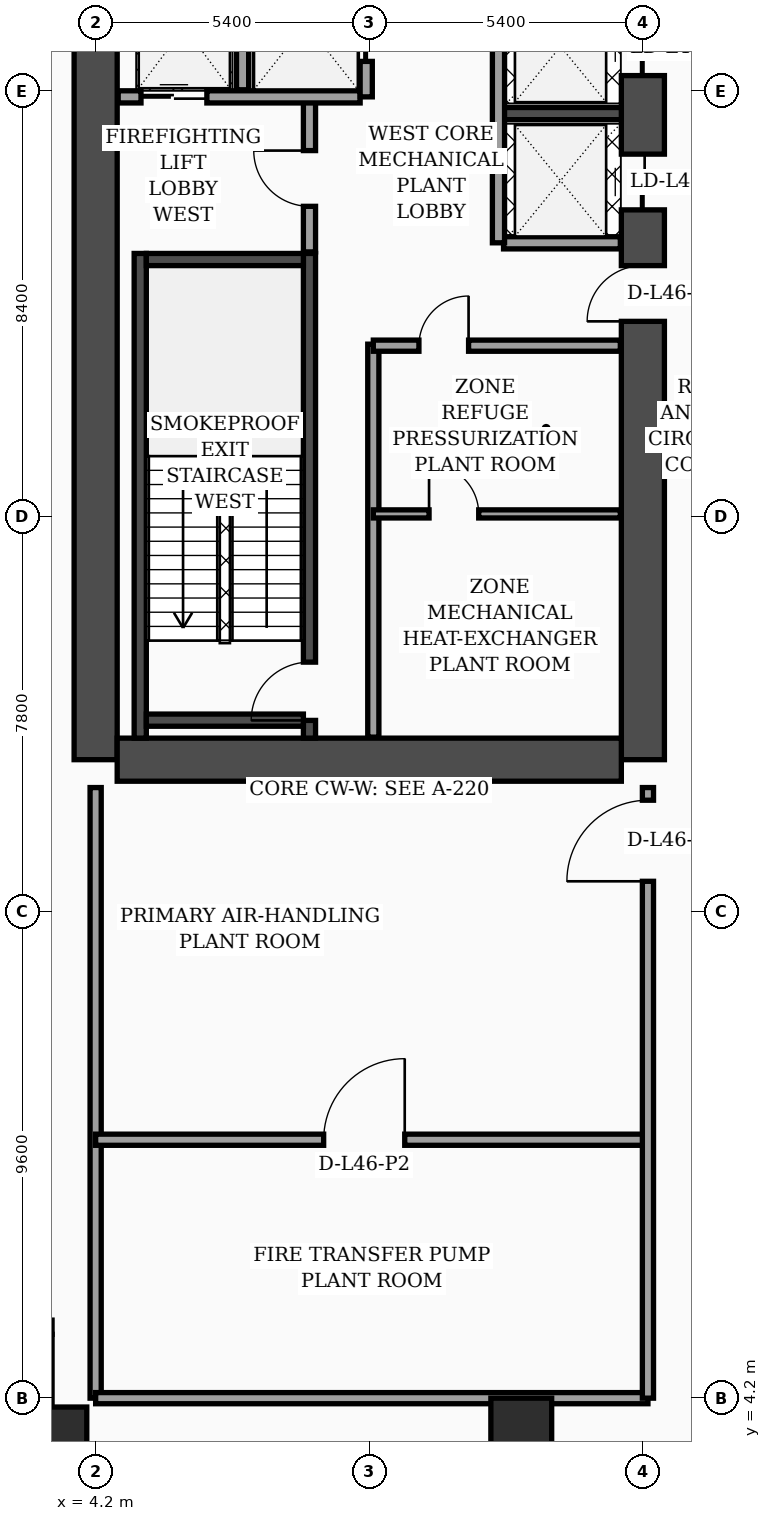
"""IFC4 building model, lengths in metres.
Left out: names, types, materials, properties, quantities, classifications, styles, units other than length and angle.
Written with IfcOpenShell. Run it as: python <this file> out.ifc"""

import sys

from ifc_helpers import new_model, si_unit, direction, frame, frame_2d, origin, origin_2d, place, context, subcontext, project, spatial, rectangle, hollow_rectangle, extrude, element, fill, save


model = new_model("IFC4")
c1 = context("Model", 3, precision=1e-05, world=origin(), true_north=direction((0.0, 1.0)))
c2 = subcontext(c1, "Body", "Model", "MODEL_VIEW")
j1 = project(units=[si_unit("LENGTHUNIT", "METRE"), si_unit("PLANEANGLEUNIT", "RADIAN")], contexts=[c1])
p1 = place(None, origin())
s1 = spatial("IfcSite", under=j1, at=p1, CompositionType="ELEMENT")
p2 = place(p1, origin())
s2 = spatial("IfcBuilding", under=s1, at=p2, CompositionType="ELEMENT")
p3 = place(p2, frame((0.0, 0.0, 186.5)))
s3 = spatial("IfcBuildingStorey", under=s2, at=p3, CompositionType="ELEMENT", Elevation=186.5)
p4 = place(p3, frame((4.2, 16.8, 0.0), z_axis=(0.0, 0.0, 1.0), x_axis=(0.0, 1.0, 0.0)))
e1 = element("IfcWall", 1, at=p4, inside=s3, PredefinedType="SHEAR", context=c2, shape_type="SweptSolid", body=[
    extrude(rectangle(XDim=21.6, YDim=0.85, at=frame_2d((10.8, 0.0))), origin(), (0.0, 0.0, 1.0), 4.35),
])
p5 = place(p3, frame((15.0, 16.8, 0.0), z_axis=(0.0, 0.0, 1.0), x_axis=(0.0, 1.0, 0.0)))
e2 = element("IfcWall", 2, at=p5, inside=s3, PredefinedType="SHEAR", context=c2, shape_type="SweptSolid", body=[
    extrude(rectangle(XDim=21.6, YDim=0.85, at=frame_2d((10.8, 0.0))), origin(), (0.0, 0.0, 1.0), 4.35),
])
p6 = place(p5, frame((8.65, 0.0, 0.0)))
e3 = element("IfcOpeningElement", 3, at=p6, cuts=e2, PredefinedType="OPENING", context=c2, shape_type="SweptSolid", body=[
    extrude(rectangle(XDim=1.1, YDim=2.2, at=frame_2d((0.55, 1.1))), frame((0.0, 0.435, 0.0), z_axis=(0.0, -1.0, 0.0), x_axis=(1.0, 0.0, 0.0)), (0.0, 0.0, 1.0), 0.87),
])
p7 = place(p5, frame((10.85, 0.0, 0.0)))
e4 = element("IfcOpeningElement", 4, at=p7, cuts=e2, PredefinedType="OPENING", context=c2, shape_type="SweptSolid", body=[
    extrude(rectangle(XDim=1.1, YDim=2.2, at=frame_2d((0.55, 1.1))), frame((0.0, 0.435, 0.0), z_axis=(0.0, -1.0, 0.0), x_axis=(1.0, 0.0, 0.0)), (0.0, 0.0, 1.0), 0.87),
])
p8 = place(p5, frame((13.5, 0.0, 0.0)))
e5 = element("IfcOpeningElement", 5, at=p8, cuts=e2, PredefinedType="OPENING", context=c2, shape_type="SweptSolid", body=[
    extrude(rectangle(XDim=1.1, YDim=2.2, at=frame_2d((0.55, 1.1))), frame((0.0, 0.435, 0.0), z_axis=(0.0, -1.0, 0.0), x_axis=(1.0, 0.0, 0.0)), (0.0, 0.0, 1.0), 0.87),
])
p9 = place(p5, frame((16.15, 0.0, 0.0)))
e6 = element("IfcOpeningElement", 6, at=p9, cuts=e2, PredefinedType="OPENING", context=c2, shape_type="SweptSolid", body=[
    extrude(rectangle(XDim=1.1, YDim=2.2, at=frame_2d((0.55, 1.1))), frame((0.0, 0.435, 0.0), z_axis=(0.0, -1.0, 0.0), x_axis=(1.0, 0.0, 0.0)), (0.0, 0.0, 1.0), 0.87),
])
p10 = place(p3, frame((4.625, 16.8, 0.0), z_axis=(0.0, 0.0, 1.0), x_axis=(1.0, 0.0, 0.0)))
e7 = element("IfcWall", 7, at=p10, inside=s3, PredefinedType="SHEAR", context=c2, shape_type="SweptSolid", body=[
    extrude(rectangle(XDim=9.95, YDim=0.85, at=frame_2d((4.975, 0.0))), origin(), (0.0, 0.0, 1.0), 4.35),
])
p11 = place(p3, frame((5.08, 17.225, 0.0), z_axis=(0.0, 0.0, 1.0), x_axis=(0.0, 1.0, 0.0)))
e8 = element("IfcWall", 8, at=p11, inside=s3, PredefinedType="SOLIDWALL", context=c2, shape_type="SweptSolid", body=[
    extrude(rectangle(XDim=9.565, YDim=0.24, at=frame_2d((4.782, 0.0))), origin(), (0.0, 0.0, 1.0), 4.35),
])
p12 = place(p3, frame((8.42, 17.225, 0.0), z_axis=(0.0, 0.0, 1.0), x_axis=(0.0, 1.0, 0.0)))
e9 = element("IfcWall", 9, at=p12, inside=s3, PredefinedType="SOLIDWALL", context=c2, shape_type="SweptSolid", body=[
    extrude(rectangle(XDim=9.565, YDim=0.24, at=frame_2d((4.782, 0.0))), origin(), (0.0, 0.0, 1.0), 4.35),
])
p13 = place(p12, frame((0.35, 0.0, 0.0)))
e10 = element("IfcOpeningElement", 10, at=p13, cuts=e9, PredefinedType="OPENING", context=c2, shape_type="SweptSolid", body=[
    extrude(rectangle(XDim=1.15, YDim=2.2, at=frame_2d((0.575, 1.1))), frame((0.0, 0.13, 0.0), z_axis=(0.0, -1.0, 0.0), x_axis=(1.0, 0.0, 0.0)), (0.0, 0.0, 1.0), 0.26),
])
for number, where, z_axis, x_axis in (
    (11, (5.2, 17.58, 0.0), (0.0, 0.0, 1.0), (1.0, 0.0, 0.0)),
    (12, (5.2, 26.67, 0.0), (0.0, 0.0, 1.0), (1.0, 0.0, 0.0)),
):
    element("IfcWall", number, at=place(p3, frame(where, z_axis=z_axis, x_axis=x_axis)), inside=s3, PredefinedType="SOLIDWALL", context=c2, shape_type="SweptSolid", body=[
        extrude(rectangle(XDim=3.1, YDim=0.24, at=frame_2d((1.55, 0.0))), origin(), (0.0, 0.0, 1.0), 4.35),
    ])
p14 = place(p3, frame((12.18, 29.55, 0.0), z_axis=(0.0, 0.0, 1.0), x_axis=(1.0, 0.0, 0.0)))
e13 = element("IfcWall", 13, at=p14, inside=s3, PredefinedType="SOLIDWALL", context=c2, shape_type="SweptSolid", body=[
    extrude(rectangle(XDim=2.395, YDim=0.24, at=frame_2d((1.198, 0.0))), origin(), (0.0, 0.0, 1.0), 4.35),
])
p15 = place(p3, frame((3.6, 3.6, 0.0), z_axis=(0.0, 0.0, 1.0), x_axis=(1.0, 0.0, 0.0)))
e14 = element("IfcColumn", 14, at=p15, inside=s3, PredefinedType="COLUMN", context=c2, shape_type="SweptSolid", body=[
    extrude(hollow_rectangle(XDim=0.85, YDim=0.85, WallThickness=0.036, at=origin_2d()), origin(), (0.0, 0.0, 1.0), 4.35),
])
p16 = place(p3, frame((12.6, 3.6, 0.0), z_axis=(0.0, 0.0, 1.0), x_axis=(1.0, 0.0, 0.0)))
e15 = element("IfcColumn", 15, at=p16, inside=s3, PredefinedType="COLUMN", context=c2, shape_type="SweptSolid", body=[
    extrude(rectangle(XDim=1.2, YDim=1.2, at=origin_2d()), origin(), (0.0, 0.0, 1.0), 4.35),
])
p17 = place(p3, frame((8.42, 26.82, 0.0), z_axis=(0.0, 0.0, 1.0), x_axis=(0.0, 1.0, 0.0)))
e16 = element("IfcWall", 16, at=p17, inside=s3, PredefinedType="SOLIDWALL", context=c2, shape_type="SweptSolid", body=[
    extrude(rectangle(XDim=3.0, YDim=0.24, at=frame_2d((1.5, 0.0))), origin(), (0.0, 0.0, 1.0), 4.35),
])
p18 = place(p17, frame((0.9, 0.0, 0.0)))
e17 = element("IfcOpeningElement", 17, at=p18, cuts=e16, PredefinedType="OPENING", context=c2, shape_type="SweptSolid", body=[
    extrude(rectangle(XDim=1.1, YDim=2.2, at=frame_2d((0.55, 1.1))), frame((0.0, 0.13, 0.0), z_axis=(0.0, -1.0, 0.0), x_axis=(1.0, 0.0, 0.0)), (0.0, 0.0, 1.0), 0.26),
])
p19 = place(p3, frame((4.645, 29.88, 0.0), z_axis=(0.0, 0.0, 1.0), x_axis=(1.0, 0.0, 0.0)))
e18 = element("IfcWall", 18, at=p19, inside=s3, PredefinedType="SOLIDWALL", context=c2, shape_type="SweptSolid", body=[
    extrude(rectangle(XDim=4.775, YDim=0.24, at=frame_2d((2.387, 0.0))), origin(), (0.0, 0.0, 1.0), 4.35),
])
p20 = place(p19, frame((0.45, 0.0, 0.0)))
e19 = element("IfcOpeningElement", 19, at=p20, cuts=e18, PredefinedType="OPENING", context=c2, shape_type="SweptSolid", body=[
    extrude(rectangle(XDim=1.3, YDim=2.35, at=frame_2d((0.65, 1.175))), frame((0.0, 0.13, 0.0), z_axis=(0.0, -1.0, 0.0), x_axis=(1.0, 0.0, 0.0)), (0.0, 0.0, 1.0), 0.26),
])
p21 = place(p3, frame((7.1, 30.02, 0.0), z_axis=(0.0, 0.0, 1.0), x_axis=(0.0, 1.0, 0.0)))
e20 = element("IfcWall", 20, at=p21, inside=s3, PredefinedType="SOLIDWALL", context=c2, shape_type="SweptSolid", body=[
    extrude(rectangle(XDim=2.63, YDim=0.24, at=frame_2d((1.315, 0.0))), origin(), (0.0, 0.0, 1.0), 4.35),
])
p22 = place(p3, frame((9.54, 29.88, 0.0), z_axis=(0.0, 0.0, 1.0), x_axis=(0.0, 1.0, 0.0)))
e21 = element("IfcWall", 21, at=p22, inside=s3, PredefinedType="SOLIDWALL", context=c2, shape_type="SweptSolid", body=[
    extrude(rectangle(XDim=2.9, YDim=0.24, at=frame_2d((1.45, 0.0))), origin(), (0.0, 0.0, 1.0), 4.35),
])
p23 = place(p22, frame((0.7, 0.0, 0.0)))
e22 = element("IfcOpeningElement", 22, at=p23, cuts=e21, PredefinedType="OPENING", context=c2, shape_type="SweptSolid", body=[
    extrude(rectangle(XDim=1.3, YDim=2.35, at=frame_2d((0.65, 1.175))), frame((0.0, 0.13, 0.0), z_axis=(0.0, -1.0, 0.0), x_axis=(1.0, 0.0, 0.0)), (0.0, 0.0, 1.0), 0.26),
])
p24 = place(p3, frame((9.68, 17.245, 0.0), z_axis=(0.0, 0.0, 1.0), x_axis=(0.0, 1.0, 0.0)))
e23 = element("IfcWall", 23, at=p24, inside=s3, PredefinedType="SOLIDWALL", context=c2, shape_type="SweptSolid", body=[
    extrude(rectangle(XDim=7.755, YDim=0.22, at=frame_2d((3.877, 0.0))), origin(), (0.0, 0.0, 1.0), 4.35),
])
p25 = place(p3, frame((9.68, 21.65, 0.0), z_axis=(0.0, 0.0, 1.0), x_axis=(1.0, 0.0, 0.0)))
e24 = element("IfcWall", 24, at=p25, inside=s3, PredefinedType="PARTITIONING", context=c2, shape_type="SweptSolid", body=[
    extrude(rectangle(XDim=4.875, YDim=0.16, at=frame_2d((2.438, 0.0))), origin(), (0.0, 0.0, 1.0), 4.35),
])
p26 = place(p25, frame((1.1, 0.0, 0.0)))
e25 = element("IfcOpeningElement", 25, at=p26, cuts=e24, PredefinedType="OPENING", context=c2, shape_type="SweptSolid", body=[
    extrude(rectangle(XDim=0.98, YDim=2.15, at=frame_2d((0.49, 1.075))), frame((0.0, 0.09, 0.0), z_axis=(0.0, -1.0, 0.0), x_axis=(1.0, 0.0, 0.0)), (0.0, 0.0, 1.0), 0.18),
])
p27 = place(p3, frame((9.68, 24.97, 0.0), z_axis=(0.0, 0.0, 1.0), x_axis=(1.0, 0.0, 0.0)))
e26 = element("IfcWall", 26, at=p27, inside=s3, PredefinedType="SOLIDWALL", context=c2, shape_type="SweptSolid", body=[
    extrude(rectangle(XDim=4.875, YDim=0.22, at=frame_2d((2.438, 0.0))), origin(), (0.0, 0.0, 1.0), 3.75),
])
p28 = place(p27, frame((0.9, 0.0, 0.0)))
e27 = element("IfcOpeningElement", 27, at=p28, cuts=e26, PredefinedType="OPENING", context=c2, shape_type="SweptSolid", body=[
    extrude(rectangle(XDim=0.98, YDim=2.15, at=frame_2d((0.49, 1.075))), frame((0.0, 0.12, 0.0), z_axis=(0.0, -1.0, 0.0), x_axis=(1.0, 0.0, 0.0)), (0.0, 0.0, 1.0), 0.24),
])
p29 = place(p3, frame((12.25, 27.0, 0.0), z_axis=(0.0, 0.0, 1.0), x_axis=(1.0, 0.0, 0.0)))
e28 = element("IfcWall", 28, at=p29, inside=s3, PredefinedType="SOLIDWALL", context=c2, shape_type="SweptSolid", body=[
    extrude(rectangle(XDim=2.305, YDim=0.24, at=frame_2d((1.152, 0.0))), origin(), (0.0, 0.0, 1.0), 4.35),
])
p30 = place(p3, frame((12.15, 27.0, 0.0), z_axis=(0.0, 0.0, 1.0), x_axis=(0.0, 1.0, 0.0)))
e29 = element("IfcWall", 29, at=p30, inside=s3, PredefinedType="SOLIDWALL", context=c2, shape_type="SweptSolid", body=[
    extrude(rectangle(XDim=7.75, YDim=0.24, at=frame_2d((3.875, 0.0))), origin(), (0.0, 0.0, 1.0), 4.35),
])
p31 = place(p3, frame((4.2, 4.2, 0.0), z_axis=(0.0, 0.0, 1.0), x_axis=(0.0, 1.0, 0.0)))
e30 = element("IfcWall", 30, at=p31, inside=s3, PredefinedType="SOLIDWALL", context=c2, shape_type="SweptSolid", body=[
    extrude(rectangle(XDim=12.05, YDim=0.22, at=frame_2d((6.025, 0.0))), origin(), (0.0, 0.0, 1.0), 3.75),
])
p32 = place(p3, frame((4.2, 4.2, 0.0), z_axis=(0.0, 0.0, 1.0), x_axis=(1.0, 0.0, 0.0)))
e31 = element("IfcWall", 31, at=p32, inside=s3, PredefinedType="SOLIDWALL", context=c2, shape_type="SweptSolid", body=[
    extrude(rectangle(XDim=10.9, YDim=0.22, at=frame_2d((5.45, 0.0))), origin(), (0.0, 0.0, 1.0), 3.75),
])
p33 = place(p3, frame((4.2, 9.3, 0.0), z_axis=(0.0, 0.0, 1.0), x_axis=(1.0, 0.0, 0.0)))
e32 = element("IfcWall", 32, at=p33, inside=s3, PredefinedType="SOLIDWALL", context=c2, shape_type="SweptSolid", body=[
    extrude(rectangle(XDim=10.9, YDim=0.22, at=frame_2d((5.45, 0.0))), origin(), (0.0, 0.0, 1.0), 3.75),
])
p34 = place(p33, frame((4.5, 0.0, 0.0)))
e33 = element("IfcOpeningElement", 33, at=p34, cuts=e32, PredefinedType="OPENING", context=c2, shape_type="SweptSolid", body=[
    extrude(rectangle(XDim=1.6, YDim=2.35, at=frame_2d((0.8, 1.175))), frame((0.0, 0.12, 0.0), z_axis=(0.0, -1.0, 0.0), x_axis=(1.0, 0.0, 0.0)), (0.0, 0.0, 1.0), 0.24),
])
p35 = place(p3, frame((15.1, 4.2, 0.0), z_axis=(0.0, 0.0, 1.0), x_axis=(0.0, 1.0, 0.0)))
e34 = element("IfcWall", 34, at=p35, inside=s3, PredefinedType="SOLIDWALL", context=c2, shape_type="SweptSolid", body=[
    extrude(rectangle(XDim=12.05, YDim=0.22, at=frame_2d((6.025, 0.0))), origin(), (0.0, 0.0, 1.0), 3.3),
])
p36 = place(p35, frame((10.2, 0.0, 0.0)))
e35 = element("IfcOpeningElement", 35, at=p36, cuts=e34, PredefinedType="OPENING", context=c2, shape_type="SweptSolid", body=[
    extrude(rectangle(XDim=1.6, YDim=2.35, at=frame_2d((0.8, 1.175))), frame((0.0, 0.12, 0.0), z_axis=(0.0, -1.0, 0.0), x_axis=(1.0, 0.0, 0.0)), (0.0, 0.0, 1.0), 0.24),
])
p37 = place(p18, origin())
e36 = element("IfcDoor", 36, at=p37, inside=s3, OperationType="SINGLE_SWING_RIGHT", PredefinedType="DOOR", context=c2, shape_type="SweptSolid", body=[
    extrude(rectangle(XDim=1.1, YDim=2.2, at=frame_2d((0.55, 1.1))), frame((0.0, 0.025, 0.0), z_axis=(0.0, -1.0, 0.0), x_axis=(1.0, 0.0, 0.0)), (0.0, 0.0, 1.0), 0.05),
])
fill(e17, e36)
p38 = place(p20, origin())
e37 = element("IfcDoor", 37, at=p38, inside=s3, OperationType="DOUBLE_DOOR_SLIDING", PredefinedType="DOOR", context=c2, shape_type="SweptSolid", body=[
    extrude(rectangle(XDim=1.3, YDim=2.35, at=frame_2d((0.65, 1.175))), frame((0.0, 0.025, 0.0), z_axis=(0.0, -1.0, 0.0), x_axis=(1.0, 0.0, 0.0)), (0.0, 0.0, 1.0), 0.05),
])
fill(e19, e37)
p39 = place(p23, origin())
e38 = element("IfcDoor", 38, at=p39, inside=s3, OperationType="DOUBLE_DOOR_SLIDING", PredefinedType="DOOR", context=c2, shape_type="SweptSolid", body=[
    extrude(rectangle(XDim=1.3, YDim=2.35, at=frame_2d((0.65, 1.175))), frame((0.0, 0.025, 0.0), z_axis=(0.0, -1.0, 0.0), x_axis=(1.0, 0.0, 0.0)), (0.0, 0.0, 1.0), 0.05),
])
fill(e22, e38)
p40 = place(p26, origin())
e39 = element("IfcDoor", 39, at=p40, inside=s3, OperationType="SINGLE_SWING_LEFT", PredefinedType="DOOR", context=c2, shape_type="SweptSolid", body=[
    extrude(rectangle(XDim=0.98, YDim=2.15, at=frame_2d((0.49, 1.075))), frame((0.0, 0.025, 0.0), z_axis=(0.0, -1.0, 0.0), x_axis=(1.0, 0.0, 0.0)), (0.0, 0.0, 1.0), 0.05),
])
fill(e25, e39)
p41 = place(p28, origin())
e40 = element("IfcDoor", 40, at=p41, inside=s3, OperationType="SINGLE_SWING_RIGHT", PredefinedType="DOOR", context=c2, shape_type="SweptSolid", body=[
    extrude(rectangle(XDim=0.98, YDim=2.15, at=frame_2d((0.49, 1.075))), frame((0.0, 0.025, 0.0), z_axis=(0.0, -1.0, 0.0), x_axis=(1.0, 0.0, 0.0)), (0.0, 0.0, 1.0), 0.05),
])
fill(e27, e40)
p42 = place(p34, origin())
e41 = element("IfcDoor", 41, at=p42, inside=s3, OperationType="SINGLE_SWING_RIGHT", PredefinedType="DOOR", context=c2, shape_type="SweptSolid", body=[
    extrude(rectangle(XDim=1.6, YDim=2.35, at=frame_2d((0.8, 1.175))), frame((0.0, 0.025, 0.0), z_axis=(0.0, -1.0, 0.0), x_axis=(1.0, 0.0, 0.0)), (0.0, 0.0, 1.0), 0.05),
])
fill(e33, e41)
p43 = place(p36, origin())
e42 = element("IfcDoor", 42, at=p43, inside=s3, OperationType="SINGLE_SWING_LEFT", PredefinedType="DOOR", context=c2, shape_type="SweptSolid", body=[
    extrude(rectangle(XDim=1.6, YDim=2.35, at=frame_2d((0.8, 1.175))), frame((0.0, 0.025, 0.0), z_axis=(0.0, -1.0, 0.0), x_axis=(1.0, 0.0, 0.0)), (0.0, 0.0, 1.0), 0.05),
])
fill(e35, e42)
p44 = place(p13, origin())
e43 = element("IfcDoor", 43, at=p44, inside=s3, OperationType="SINGLE_SWING_LEFT", PredefinedType="DOOR", context=c2, shape_type="SweptSolid", body=[
    extrude(rectangle(XDim=1.15, YDim=2.2, at=frame_2d((0.575, 1.1))), frame((0.0, 0.025, 0.0), z_axis=(0.0, -1.0, 0.0), x_axis=(1.0, 0.0, 0.0)), (0.0, 0.0, 1.0), 0.05),
])
fill(e10, e43)
p45 = place(p6, origin())
e44 = element("IfcDoor", 44, at=p45, inside=s3, OperationType="SINGLE_SWING_LEFT", PredefinedType="DOOR", context=c2, shape_type="SweptSolid", body=[
    extrude(rectangle(XDim=1.1, YDim=2.2, at=frame_2d((0.55, 1.1))), frame((0.0, 0.025, 0.0), z_axis=(0.0, -1.0, 0.0), x_axis=(1.0, 0.0, 0.0)), (0.0, 0.0, 1.0), 0.05),
])
fill(e3, e44)
p46 = place(p7, origin())
e45 = element("IfcDoor", 45, at=p46, inside=s3, OperationType="DOUBLE_DOOR_SLIDING", PredefinedType="DOOR", context=c2, shape_type="SweptSolid", body=[
    extrude(rectangle(XDim=1.1, YDim=2.2, at=frame_2d((0.55, 1.1))), frame((0.0, 0.025, 0.0), z_axis=(0.0, -1.0, 0.0), x_axis=(1.0, 0.0, 0.0)), (0.0, 0.0, 1.0), 0.05),
])
fill(e4, e45)
p47 = place(p8, origin())
e46 = element("IfcDoor", 46, at=p47, inside=s3, OperationType="DOUBLE_DOOR_SLIDING", PredefinedType="DOOR", context=c2, shape_type="SweptSolid", body=[
    extrude(rectangle(XDim=1.1, YDim=2.2, at=frame_2d((0.55, 1.1))), frame((0.0, 0.025, 0.0), z_axis=(0.0, -1.0, 0.0), x_axis=(1.0, 0.0, 0.0)), (0.0, 0.0, 1.0), 0.05),
])
fill(e5, e46)
save(model, sys.argv[1])
